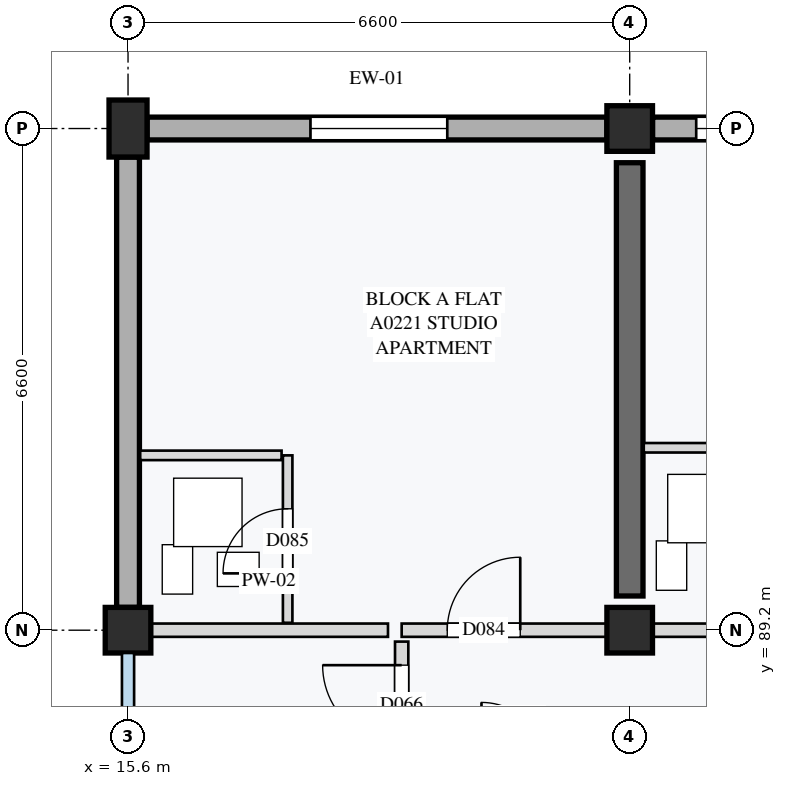
"""IFC4 building model, lengths in metres.
Left out: names, types, materials, properties, quantities, classifications, styles, units other than length and angle.
Written with IfcOpenShell. Run it as: python <this file> out.ifc"""

import sys

from ifc_helpers import new_model, si_unit, direction, frame, frame_2d, origin, origin_2d, place, context, subcontext, project, spatial, rectangle, extrude, element, fill, save


model = new_model("IFC4")
c1 = context("Model", 3, precision=1e-05, world=origin(), true_north=direction((0.0, 1.0)))
c2 = subcontext(c1, "Body", "Model", "MODEL_VIEW")
j1 = project(units=[si_unit("LENGTHUNIT", "METRE"), si_unit("PLANEANGLEUNIT", "RADIAN")], contexts=[c1])
p1 = place(None, origin())
s1 = spatial("IfcSite", under=j1, at=p1, CompositionType="ELEMENT")
p2 = place(p1, origin())
s2 = spatial("IfcBuilding", under=s1, at=p2, CompositionType="ELEMENT")
p3 = place(p2, frame((0.0, 0.0, 8.4)))
s3 = spatial("IfcBuildingStorey", under=s2, at=p3, CompositionType="ELEMENT", Elevation=8.4)
p4 = place(p3, frame((15.6, 89.2, 0.0), z_axis=(0.0, 0.0, 1.0), x_axis=(1.0, 0.0, 0.0)))
e1 = element("IfcColumn", 1, at=p4, inside=s3, PredefinedType="COLUMN", context=c2, shape_type="SweptSolid", body=[
    extrude(rectangle(XDim=0.6, YDim=0.6, at=origin_2d()), origin(), (0.0, 0.0, 1.0), 3.2),
])
p5 = place(p3, frame((15.6, 95.8, 0.0), z_axis=(0.0, 0.0, 1.0), x_axis=(1.0, 0.0, 0.0)))
e2 = element("IfcColumn", 2, at=p5, inside=s3, PredefinedType="COLUMN", context=c2, shape_type="SweptSolid", body=[
    extrude(rectangle(XDim=0.5, YDim=0.75, at=origin_2d()), origin(), (0.0, 0.0, 1.0), 3.2),
])
for number, where, z_axis, x_axis in (
    (3, (22.2, 89.2, 0.0), (0.0, 0.0, 1.0), (1.0, 0.0, 0.0)),
    (4, (22.2, 95.8, 0.0), (0.0, 0.0, 1.0), (1.0, 0.0, 0.0)),
):
    element("IfcColumn", number, at=place(p3, frame(where, z_axis=z_axis, x_axis=x_axis)), inside=s3, PredefinedType="COLUMN", context=c2, shape_type="SweptSolid", body=[
        extrude(rectangle(XDim=0.6, YDim=0.6, at=origin_2d()), origin(), (0.0, 0.0, 1.0), 3.2),
    ])
p6 = place(p3, frame((22.2, 89.65, 0.0), z_axis=(0.0, 0.0, 1.0), x_axis=(0.0, 1.0, 0.0)))
e5 = element("IfcWall", 5, at=p6, inside=s3, PredefinedType="SHEAR", context=c2, shape_type="SweptSolid", body=[
    extrude(rectangle(XDim=5.7, YDim=0.35, at=frame_2d((2.85, 0.0))), origin(), (0.0, 0.0, 1.0), 2.96),
])
p7 = place(p3, frame((15.85, 95.8, 0.0), z_axis=(0.0, 0.0, 1.0), x_axis=(1.0, 0.0, 0.0)))
e6 = element("IfcWall", 6, at=p7, inside=s3, PredefinedType="STANDARD", context=c2, shape_type="SweptSolid", body=[
    extrude(rectangle(XDim=6.05, YDim=0.3, at=frame_2d((3.025, 0.0))), origin(), (0.0, 0.0, 1.0), 2.65),
])
p8 = place(p7, frame((2.15, 0.0, 0.85)))
e7 = element("IfcOpeningElement", 7, at=p8, cuts=e6, PredefinedType="OPENING", context=c2, shape_type="SweptSolid", body=[
    extrude(rectangle(XDim=1.8, YDim=1.35, at=frame_2d((0.9, 0.675))), frame((0.0, 0.16, 0.0), z_axis=(0.0, -1.0, 0.0), x_axis=(1.0, 0.0, 0.0)), (0.0, 0.0, 1.0), 0.32),
])
p9 = place(p3, frame((22.5, 95.8, 0.0), z_axis=(0.0, 0.0, 1.0), x_axis=(1.0, 0.0, 0.0)))
e8 = element("IfcWall", 8, at=p9, inside=s3, PredefinedType="STANDARD", context=c2, shape_type="SweptSolid", body=[
    extrude(rectangle(XDim=6.0, YDim=0.3, at=frame_2d((3.0, 0.0))), origin(), (0.0, 0.0, 1.0), 2.65),
])
p10 = place(p9, frame((0.575, 0.0, 0.85)))
e9 = element("IfcOpeningElement", 9, at=p10, cuts=e8, PredefinedType="OPENING", context=c2, shape_type="SweptSolid", body=[
    extrude(rectangle(XDim=1.8, YDim=1.35, at=frame_2d((0.9, 0.675))), frame((0.0, 0.16, 0.0), z_axis=(0.0, -1.0, 0.0), x_axis=(1.0, 0.0, 0.0)), (0.0, 0.0, 1.0), 0.32),
])
p11 = place(p9, frame((4.0, 0.0, 0.85)))
e10 = element("IfcOpeningElement", 10, at=p11, cuts=e8, PredefinedType="OPENING", context=c2, shape_type="SweptSolid", body=[
    extrude(rectangle(XDim=1.5, YDim=1.35, at=frame_2d((0.75, 0.675))), frame((0.0, 0.16, 0.0), z_axis=(0.0, -1.0, 0.0), x_axis=(1.0, 0.0, 0.0)), (0.0, 0.0, 1.0), 0.32),
])
p12 = place(p3, frame((15.6, 89.5, 0.0), z_axis=(0.0, 0.0, 1.0), x_axis=(0.0, 1.0, 0.0)))
e11 = element("IfcWall", 11, at=p12, inside=s3, PredefinedType="STANDARD", context=c2, shape_type="SweptSolid", body=[
    extrude(rectangle(XDim=5.925, YDim=0.3, at=frame_2d((2.962, 0.0))), origin(), (0.0, 0.0, 1.0), 2.65),
])
p13 = place(p3, frame((19.2, 86.05, 0.0), z_axis=(0.0, 0.0, 1.0), x_axis=(0.0, 1.0, 0.0)))
e12 = element("IfcWall", 12, at=p13, inside=s3, PredefinedType="PARTITIONING", context=c2, shape_type="SweptSolid", body=[
    extrude(rectangle(XDim=3.0, YDim=0.175, at=frame_2d((1.5, 0.0))), origin(), (0.0, 0.0, 1.0), 2.96),
])
p14 = place(p13, frame((1.65, 0.0, 0.0)))
e13 = element("IfcOpeningElement", 13, at=p14, cuts=e12, PredefinedType="OPENING", context=c2, shape_type="SweptSolid", body=[
    extrude(rectangle(XDim=1.04, YDim=2.12, at=frame_2d((0.52, 1.06))), frame((0.0, 0.097, 0.0), z_axis=(0.0, -1.0, 0.0), x_axis=(1.0, 0.0, 0.0)), (0.0, 0.0, 1.0), 0.195),
])
p15 = place(p3, frame((15.88, 89.2, 0.0), z_axis=(0.0, 0.0, 1.0), x_axis=(1.0, 0.0, 0.0)))
e14 = element("IfcWall", 14, at=p15, inside=s3, PredefinedType="PARTITIONING", context=c2, shape_type="SweptSolid", body=[
    extrude(rectangle(XDim=3.14, YDim=0.175, at=frame_2d((1.57, 0.0))), origin(), (0.0, 0.0, 1.0), 2.55),
])
p16 = place(p3, frame((19.2, 89.2, 0.0), z_axis=(0.0, 0.0, 1.0), x_axis=(1.0, 0.0, 0.0)))
e15 = element("IfcWall", 15, at=p16, inside=s3, PredefinedType="PARTITIONING", context=c2, shape_type="SweptSolid", body=[
    extrude(rectangle(XDim=3.0, YDim=0.175, at=frame_2d((1.5, 0.0))), origin(), (0.0, 0.0, 1.0), 2.55),
])
p17 = place(p16, frame((0.6, 0.0, 0.0)))
e16 = element("IfcOpeningElement", 16, at=p17, cuts=e15, PredefinedType="OPENING", context=c2, shape_type="SweptSolid", body=[
    extrude(rectangle(XDim=0.96, YDim=2.18, at=frame_2d((0.48, 1.09))), frame((0.0, 0.097, 0.0), z_axis=(0.0, -1.0, 0.0), x_axis=(1.0, 0.0, 0.0)), (0.0, 0.0, 1.0), 0.195),
])
p18 = place(p3, frame((17.7, 89.298, 0.0), z_axis=(0.0, 0.0, 1.0), x_axis=(0.0, 1.0, 0.0)))
e17 = element("IfcWall", 17, at=p18, inside=s3, PredefinedType="PARTITIONING", context=c2, shape_type="SweptSolid", body=[
    extrude(rectangle(XDim=2.202, YDim=0.125, at=frame_2d((1.101, 0.0))), origin(), (0.0, 0.0, 1.0), 2.96),
])
p19 = place(p18, frame((0.65, 0.0, 0.0)))
e18 = element("IfcOpeningElement", 18, at=p19, cuts=e17, PredefinedType="OPENING", context=c2, shape_type="SweptSolid", body=[
    extrude(rectangle(XDim=0.85, YDim=2.04, at=frame_2d((0.425, 1.02))), frame((0.0, 0.073, 0.0), z_axis=(0.0, -1.0, 0.0), x_axis=(1.0, 0.0, 0.0)), (0.0, 0.0, 1.0), 0.145),
])
p20 = place(p3, frame((15.76, 91.5, 0.0), z_axis=(0.0, 0.0, 1.0), x_axis=(1.0, 0.0, 0.0)))
e19 = element("IfcWall", 19, at=p20, inside=s3, PredefinedType="PARTITIONING", context=c2, shape_type="SweptSolid", body=[
    extrude(rectangle(XDim=1.86, YDim=0.125, at=frame_2d((0.93, 0.0))), origin(), (0.0, 0.0, 1.0), 2.96),
])
p21 = place(p3, frame((22.2, 89.2, 0.0), z_axis=(0.0, 0.0, 1.0), x_axis=(1.0, 0.0, 0.0)))
e20 = element("IfcWall", 20, at=p21, inside=s3, PredefinedType="PARTITIONING", context=c2, shape_type="SweptSolid", body=[
    extrude(rectangle(XDim=6.6, YDim=0.175, at=frame_2d((3.3, 0.0))), origin(), (0.0, 0.0, 1.0), 2.55),
])
p22 = place(p21, frame((3.85, 0.0, 0.0)))
e21 = element("IfcOpeningElement", 21, at=p22, cuts=e20, PredefinedType="OPENING", context=c2, shape_type="SweptSolid", body=[
    extrude(rectangle(XDim=0.95, YDim=2.16, at=frame_2d((0.475, 1.08))), frame((0.0, 0.097, 0.0), z_axis=(0.0, -1.0, 0.0), x_axis=(1.0, 0.0, 0.0)), (0.0, 0.0, 1.0), 0.195),
])
p23 = place(p3, frame((22.385, 91.6, 0.0), z_axis=(0.0, 0.0, 1.0), x_axis=(1.0, 0.0, 0.0)))
e22 = element("IfcWall", 22, at=p23, inside=s3, PredefinedType="PARTITIONING", context=c2, shape_type="SweptSolid", body=[
    extrude(rectangle(XDim=1.635, YDim=0.125, at=frame_2d((0.817, 0.0))), origin(), (0.0, 0.0, 1.0), 2.96),
])
p24 = place(p8, origin())
e23 = element("IfcWindow", 23, at=p24, inside=s3, PartitioningType="SINGLE_PANEL", PredefinedType="WINDOW", context=c2, shape_type="SweptSolid", body=[
    extrude(rectangle(XDim=1.8, YDim=1.35, at=frame_2d((0.9, 0.675))), frame((0.0, 0.03, 0.0), z_axis=(0.0, -1.0, 0.0), x_axis=(1.0, 0.0, 0.0)), (0.0, 0.0, 1.0), 0.06),
])
fill(e7, e23)
p25 = place(p10, origin())
e24 = element("IfcWindow", 24, at=p25, inside=s3, PartitioningType="SINGLE_PANEL", PredefinedType="WINDOW", context=c2, shape_type="SweptSolid", body=[
    extrude(rectangle(XDim=1.8, YDim=1.35, at=frame_2d((0.9, 0.675))), frame((0.0, 0.03, 0.0), z_axis=(0.0, -1.0, 0.0), x_axis=(1.0, 0.0, 0.0)), (0.0, 0.0, 1.0), 0.06),
])
fill(e9, e24)
p26 = place(p14, origin())
e25 = element("IfcDoor", 25, at=p26, inside=s3, OperationType="SINGLE_SWING_RIGHT", PredefinedType="DOOR", context=c2, shape_type="SweptSolid", body=[
    extrude(rectangle(XDim=1.04, YDim=2.12, at=frame_2d((0.52, 1.06))), frame((0.0, 0.025, 0.0), z_axis=(0.0, -1.0, 0.0), x_axis=(1.0, 0.0, 0.0)), (0.0, 0.0, 1.0), 0.05),
])
fill(e13, e25)
p27 = place(p17, origin())
e26 = element("IfcDoor", 26, at=p27, inside=s3, OperationType="SINGLE_SWING_RIGHT", PredefinedType="DOOR", context=c2, shape_type="SweptSolid", body=[
    extrude(rectangle(XDim=0.96, YDim=2.18, at=frame_2d((0.48, 1.09))), frame((0.0, 0.025, 0.0), z_axis=(0.0, -1.0, 0.0), x_axis=(1.0, 0.0, 0.0)), (0.0, 0.0, 1.0), 0.05),
])
fill(e16, e26)
p28 = place(p19, origin())
e27 = element("IfcDoor", 27, at=p28, inside=s3, OperationType="SINGLE_SWING_LEFT", PredefinedType="DOOR", context=c2, shape_type="SweptSolid", body=[
    extrude(rectangle(XDim=0.85, YDim=2.04, at=frame_2d((0.425, 1.02))), frame((0.0, 0.025, 0.0), z_axis=(0.0, -1.0, 0.0), x_axis=(1.0, 0.0, 0.0)), (0.0, 0.0, 1.0), 0.05),
])
fill(e18, e27)
save(model, sys.argv[1])
